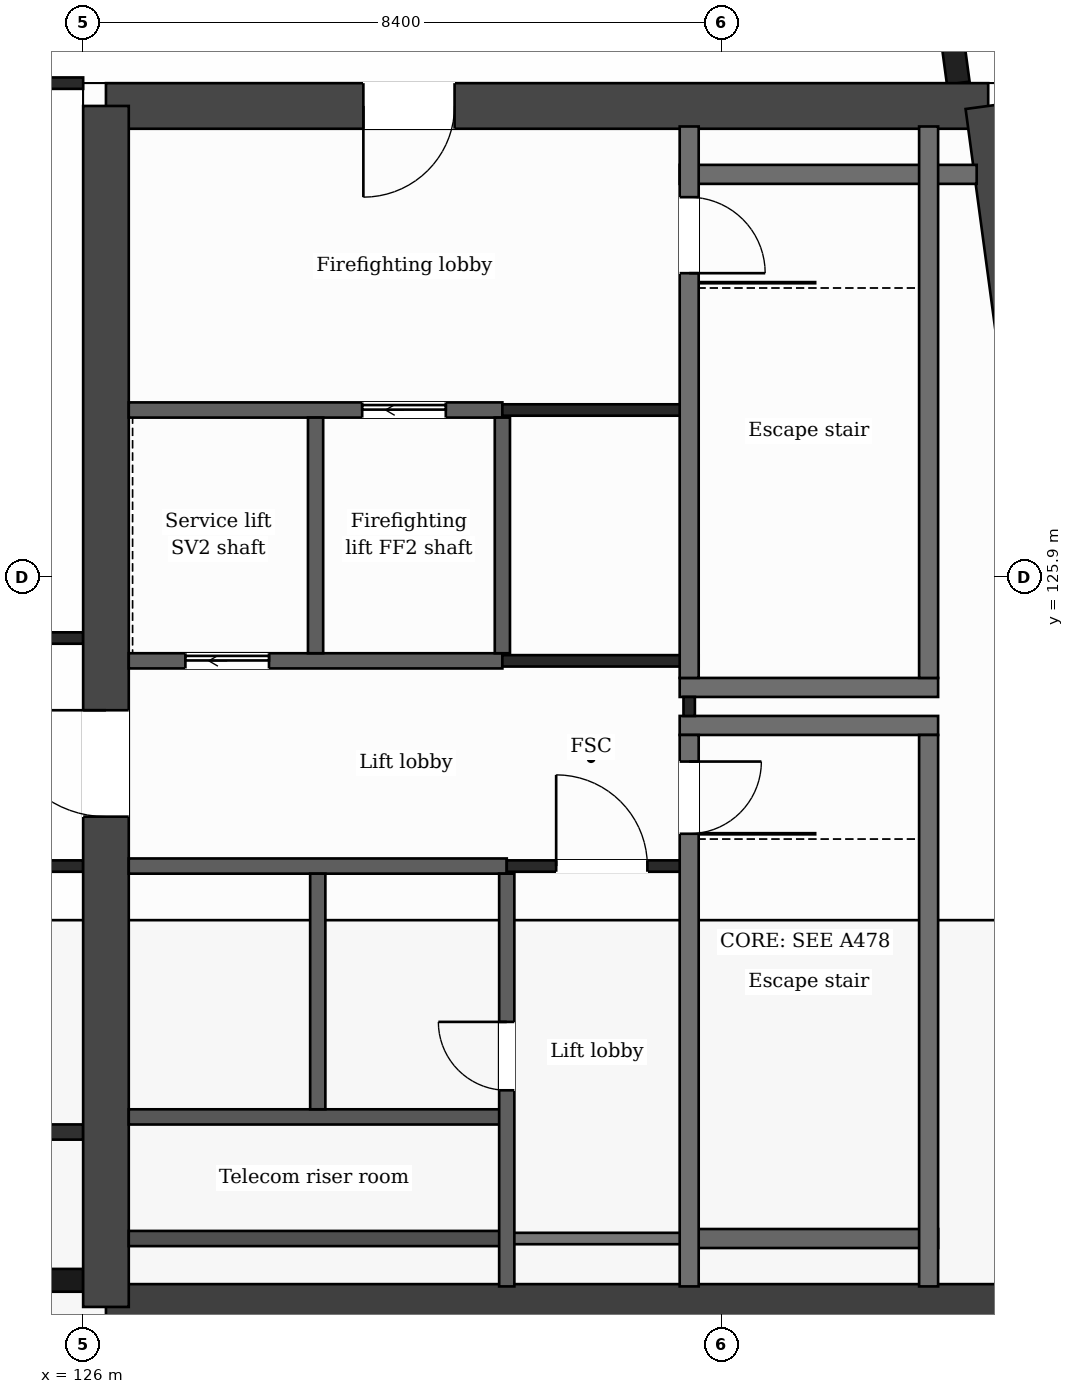
"""IFC4 building model, lengths in metres.
Left out: names, types, materials, properties, quantities, classifications, styles, units other than length and angle.
Written with IfcOpenShell. Run it as: python <this file> out.ifc"""

import sys

from ifc_helpers import new_model, si_unit, direction, frame, frame_2d, origin, place, context, subcontext, project, spatial, polyline, rectangle, outline, extrude, element, fill, save


model = new_model("IFC4")
c1 = context("Model", 3, precision=1e-05, world=origin(), true_north=direction((0.0, 1.0)))
c2 = subcontext(c1, "Body", "Model", "MODEL_VIEW")
j1 = project(units=[si_unit("LENGTHUNIT", "METRE"), si_unit("PLANEANGLEUNIT", "RADIAN")], contexts=[c1])
p1 = place(None, origin())
s1 = spatial("IfcSite", under=j1, at=p1, CompositionType="ELEMENT")
p2 = place(p1, origin())
s2 = spatial("IfcBuilding", under=s1, at=p2, CompositionType="ELEMENT")
p3 = place(p2, frame((0.0, 0.0, 319.9)))
s3 = spatial("IfcBuildingStorey", under=s2, at=p3, CompositionType="ELEMENT", Elevation=319.9)
p4 = place(p3, frame((126.3, 132.1, 0.0), z_axis=(0.0, 0.0, 1.0), x_axis=(1.0, 0.0, 0.0)))
e1 = element("IfcWall", 1, at=p4, inside=s3, PredefinedType="SHEAR", context=c2, shape_type="SweptSolid", body=[
    extrude(outline(polyline([(0.0, 0.0), (11.607, 0.0), (11.607, 9.665), (0.0, 9.665), (0.0, 0.0)])), frame((0.0, 0.3, 0.0), z_axis=(0.0, -1.0, 0.0), x_axis=(1.0, 0.0, 0.0)), (0.0, 0.0, 1.0), 0.6),
])
p5 = place(p4, frame((3.386, 0.0, 0.0)))
e2 = element("IfcOpeningElement", 2, at=p5, cuts=e1, PredefinedType="OPENING", context=c2, shape_type="SweptSolid", body=[
    extrude(rectangle(XDim=1.2, YDim=2.1, at=frame_2d((0.6, 1.05))), frame((0.0, 0.31, 0.0), z_axis=(0.0, -1.0, 0.0), x_axis=(1.0, 0.0, 0.0)), (0.0, 0.0, 1.0), 0.62),
])
p6 = place(p3, frame((137.907, 132.1, 0.0), z_axis=(0.0, 0.0, 1.0), x_axis=(0.13341345841, -0.991060466932, 0.0)))
e3 = element("IfcWall", 3, at=p6, inside=s3, PredefinedType="SHEAR", context=c2, shape_type="SweptSolid", body=[
    extrude(outline(polyline([(0.0, 0.0), (15.943, 0.0), (15.943, 1.162), (9.683, 4.5), (0.0, 9.665), (0.0, 0.0)])), frame((0.0, 0.3, 0.0), z_axis=(0.0, -1.0, 0.0), x_axis=(1.0, 0.0, 0.0)), (0.0, 0.0, 1.0), 0.6),
])
p7 = place(p3, frame((140.034, 116.3, 0.0), z_axis=(0.0, 0.0, 1.0), x_axis=(-1.0, 0.0, 0.0)))
e4 = element("IfcWall", 4, at=p7, inside=s3, PredefinedType="SHEAR", context=c2, shape_type="SweptSolid", body=[
    extrude(outline(polyline([(0.0, 0.0), (13.734, 0.0), (13.734, 1.162), (0.0, 1.162), (0.0, 0.0)])), frame((0.0, 0.3, 0.0), z_axis=(0.0, -1.0, 0.0), x_axis=(1.0, 0.0, 0.0)), (0.0, 0.0, 1.0), 0.6),
])
p8 = place(p3, frame((126.3, 116.3, 0.0), z_axis=(0.0, 0.0, 1.0), x_axis=(0.0, 1.0, 0.0)))
e5 = element("IfcWall", 5, at=p8, inside=s3, PredefinedType="SHEAR", context=c2, shape_type="SweptSolid", body=[
    extrude(outline(polyline([(0.0, 0.0), (15.8, 0.0), (15.8, 9.665), (6.203, 4.5), (0.0, 1.162), (0.0, 0.0)])), frame((0.0, 0.3, 0.0), z_axis=(0.0, -1.0, 0.0), x_axis=(1.0, 0.0, 0.0)), (0.0, 0.0, 1.0), 0.6),
])
p9 = place(p8, frame((6.45, 0.0, 0.0)))
e6 = element("IfcOpeningElement", 6, at=p9, cuts=e5, PredefinedType="OPENING", context=c2, shape_type="SweptSolid", body=[
    extrude(rectangle(XDim=1.4, YDim=2.1, at=frame_2d((0.7, 1.05))), frame((0.0, 0.31, 0.0), z_axis=(0.0, -1.0, 0.0), x_axis=(1.0, 0.0, 0.0)), (0.0, 0.0, 1.0), 0.62),
])
p10 = place(p3, frame((100.8, 116.65, 0.0), z_axis=(0.0, 0.0, 1.0), x_axis=(1.0, 0.0, 0.0)))
e7 = element("IfcWall", 7, at=p10, inside=s3, PredefinedType="SOLIDWALL", context=c2, shape_type="SweptSolid", body=[
    extrude(rectangle(XDim=25.2, YDim=0.3, at=frame_2d((12.6, 0.0))), origin(), (0.0, 0.0, 1.0), 1.3),
])
p11 = place(p3, frame((137.513, 132.4, 0.0), z_axis=(0.0, 0.0, 1.0), x_axis=(-0.133420343073, 0.991059540116, 0.0)))
e8 = element("IfcWall", 8, at=p11, inside=s3, PredefinedType="SOLIDWALL", context=c2, shape_type="SweptSolid", body=[
    extrude(rectangle(XDim=7.75, YDim=0.3, at=frame_2d((3.875, 0.0))), origin(), (0.0, 0.0, 1.0), 4.5),
])
p12 = place(p3, frame((126.6, 117.2, 0.0), z_axis=(0.0, 0.0, 1.0), x_axis=(1.0, 0.0, 0.0)))
e9 = element("IfcWall", 9, at=p12, inside=s3, PredefinedType="PARTITIONING", context=c2, shape_type="SweptSolid", body=[
    extrude(rectangle(XDim=4.973, YDim=0.2, at=frame_2d((2.486, 0.0))), origin(), (0.0, 0.0, 1.0), 1.596),
])
p13 = place(p3, frame((131.573, 117.2, 0.0), z_axis=(0.0, 0.0, 1.0), x_axis=(1.0, 0.0, 0.0)))
e10 = element("IfcWall", 10, at=p13, inside=s3, PredefinedType="PARTITIONING", context=c2, shape_type="SweptSolid", body=[
    extrude(rectangle(XDim=2.4, YDim=0.15, at=frame_2d((1.2, 0.0))), origin(), (0.0, 0.0, 1.0), 1.596),
])
p14 = place(p3, frame((133.973, 117.2, 0.0), z_axis=(0.0, 0.0, 1.0), x_axis=(1.0, 0.0, 0.0)))
e11 = element("IfcWall", 11, at=p14, inside=s3, PredefinedType="PARTITIONING", context=c2, shape_type="SweptSolid", body=[
    extrude(rectangle(XDim=3.275, YDim=0.25, at=frame_2d((1.638, 0.0))), origin(), (0.0, 0.0, 1.0), 1.596),
])
p15 = place(p3, frame((100.8, 118.601, 0.0), z_axis=(0.0, 0.0, 1.0), x_axis=(1.0, 0.0, 0.0)))
e12 = element("IfcWall", 12, at=p15, inside=s3, PredefinedType="PARTITIONING", context=c2, shape_type="SweptSolid", body=[
    extrude(rectangle(XDim=25.2, YDim=0.2, at=frame_2d((12.6, 0.0))), origin(), (0.0, 0.0, 1.0), 2.35),
])
p16 = place(p3, frame((126.6, 118.8, 0.0), z_axis=(0.0, 0.0, 1.0), x_axis=(1.0, 0.0, 0.0)))
e13 = element("IfcWall", 13, at=p16, inside=s3, PredefinedType="PARTITIONING", context=c2, shape_type="SweptSolid", body=[
    extrude(rectangle(XDim=4.973, YDim=0.2, at=frame_2d((2.486, 0.0))), origin(), (0.0, 0.0, 1.0), 2.457),
])
p17 = place(p3, frame((126.6, 122.1, 0.0), z_axis=(0.0, 0.0, 1.0), x_axis=(1.0, 0.0, 0.0)))
e14 = element("IfcWall", 14, at=p17, inside=s3, PredefinedType="PARTITIONING", context=c2, shape_type="SweptSolid", body=[
    extrude(rectangle(XDim=4.973, YDim=0.2, at=frame_2d((2.486, 0.0))), origin(), (0.0, 0.0, 1.0), 4.05),
])
p18 = place(p3, frame((131.573, 122.1, 0.0), z_axis=(0.0, 0.0, 1.0), x_axis=(1.0, 0.0, 0.0)))
e15 = element("IfcWall", 15, at=p18, inside=s3, PredefinedType="PARTITIONING", context=c2, shape_type="SweptSolid", body=[
    extrude(rectangle(XDim=2.4, YDim=0.15, at=frame_2d((1.2, 0.0))), origin(), (0.0, 0.0, 1.0), 4.05),
])
p19 = place(p18, frame((0.65, 0.0, 0.0)))
e16 = element("IfcOpeningElement", 16, at=p19, cuts=e15, PredefinedType="OPENING", context=c2, shape_type="SweptSolid", body=[
    extrude(rectangle(XDim=1.2, YDim=2.1, at=frame_2d((0.6, 1.05))), frame((0.0, 0.085, 0.0), z_axis=(0.0, -1.0, 0.0), x_axis=(1.0, 0.0, 0.0)), (0.0, 0.0, 1.0), 0.17),
])
p20 = place(p3, frame((100.8, 122.1, 0.0), z_axis=(0.0, 0.0, 1.0), x_axis=(1.0, 0.0, 0.0)))
e17 = element("IfcWall", 17, at=p20, inside=s3, PredefinedType="PARTITIONING", context=c2, shape_type="SweptSolid", body=[
    extrude(rectangle(XDim=25.2, YDim=0.15, at=frame_2d((12.6, 0.0))), origin(), (0.0, 0.0, 1.0), 4.05),
])
p21 = place(p20, frame((3.6, 0.0, 0.0)))
e18 = element("IfcOpeningElement", 18, at=p21, cuts=e17, PredefinedType="OPENING", context=c2, shape_type="SweptSolid", body=[
    extrude(rectangle(XDim=1.2, YDim=2.1, at=frame_2d((0.6, 1.05))), frame((0.0, 0.085, 0.0), z_axis=(0.0, -1.0, 0.0), x_axis=(1.0, 0.0, 0.0)), (0.0, 0.0, 1.0), 0.17),
])
p22 = place(p20, frame((12.0, 0.0, 0.0)))
e19 = element("IfcOpeningElement", 19, at=p22, cuts=e17, PredefinedType="OPENING", context=c2, shape_type="SweptSolid", body=[
    extrude(rectangle(XDim=1.2, YDim=2.1, at=frame_2d((0.6, 1.05))), frame((0.0, 0.085, 0.0), z_axis=(0.0, -1.0, 0.0), x_axis=(1.0, 0.0, 0.0)), (0.0, 0.0, 1.0), 0.17),
])
p23 = place(p20, frame((20.4, 0.0, 0.0)))
e20 = element("IfcOpeningElement", 20, at=p23, cuts=e17, PredefinedType="OPENING", context=c2, shape_type="SweptSolid", body=[
    extrude(rectangle(XDim=1.2, YDim=2.1, at=frame_2d((0.6, 1.05))), frame((0.0, 0.085, 0.0), z_axis=(0.0, -1.0, 0.0), x_axis=(1.0, 0.0, 0.0)), (0.0, 0.0, 1.0), 0.17),
])
for number, where, z_axis, x_axis in (
    (21, (133.848, 123.95, 0.0), (0.0, 0.0, 1.0), (1.0, 0.0, 0.0)),
    (22, (133.848, 124.45, 0.0), (0.0, 0.0, 1.0), (1.0, 0.0, 0.0)),
):
    element("IfcWall", number, at=place(p3, frame(where, z_axis=z_axis, x_axis=x_axis)), inside=s3, PredefinedType="PARTITIONING", context=c2, shape_type="SweptSolid", body=[
        extrude(rectangle(XDim=3.4, YDim=0.25, at=frame_2d((1.7, 0.0))), origin(), (0.0, 0.0, 1.0), 4.05),
    ])
p24 = place(p3, frame((126.6, 124.8, 0.0), z_axis=(0.0, 0.0, 1.0), x_axis=(1.0, 0.0, 0.0)))
e23 = element("IfcWall", 23, at=p24, inside=s3, PredefinedType="PARTITIONING", context=c2, shape_type="SweptSolid", body=[
    extrude(rectangle(XDim=4.915, YDim=0.2, at=frame_2d((2.458, 0.0))), origin(), (0.0, 0.0, 1.0), 4.05),
])
p25 = place(p24, frame((0.745, 0.0, 0.0)))
e24 = element("IfcOpeningElement", 24, at=p25, cuts=e23, PredefinedType="OPENING", context=c2, shape_type="SweptSolid", body=[
    extrude(rectangle(XDim=1.1, YDim=2.1, at=frame_2d((0.55, 1.05))), frame((0.0, 0.11, 0.0), z_axis=(0.0, -1.0, 0.0), x_axis=(1.0, 0.0, 0.0)), (0.0, 0.0, 1.0), 0.22),
])
p26 = place(p3, frame((131.515, 124.8, 0.0), z_axis=(0.0, 0.0, 1.0), x_axis=(1.0, 0.0, 0.0)))
e25 = element("IfcWall", 25, at=p26, inside=s3, PredefinedType="PARTITIONING", context=c2, shape_type="SweptSolid", body=[
    extrude(rectangle(XDim=2.583, YDim=0.15, at=frame_2d((1.291, 0.0))), origin(), (0.0, 0.0, 1.0), 4.05),
])
p27 = place(p3, frame((100.8, 125.1, 0.0), z_axis=(0.0, 0.0, 1.0), x_axis=(1.0, 0.0, 0.0)))
e26 = element("IfcWall", 26, at=p27, inside=s3, PredefinedType="PARTITIONING", context=c2, shape_type="SweptSolid", body=[
    extrude(rectangle(XDim=25.2, YDim=0.15, at=frame_2d((12.6, 0.0))), origin(), (0.0, 0.0, 1.0), 4.05),
])
p28 = place(p27, frame((3.6, 0.0, 0.0)))
e27 = element("IfcOpeningElement", 27, at=p28, cuts=e26, PredefinedType="OPENING", context=c2, shape_type="SweptSolid", body=[
    extrude(rectangle(XDim=1.2, YDim=2.1, at=frame_2d((0.6, 1.05))), frame((0.0, 0.085, 0.0), z_axis=(0.0, -1.0, 0.0), x_axis=(1.0, 0.0, 0.0)), (0.0, 0.0, 1.0), 0.17),
])
p29 = place(p27, frame((12.0, 0.0, 0.0)))
e28 = element("IfcOpeningElement", 28, at=p29, cuts=e26, PredefinedType="OPENING", context=c2, shape_type="SweptSolid", body=[
    extrude(rectangle(XDim=1.2, YDim=2.1, at=frame_2d((0.6, 1.05))), frame((0.0, 0.085, 0.0), z_axis=(0.0, -1.0, 0.0), x_axis=(1.0, 0.0, 0.0)), (0.0, 0.0, 1.0), 0.17),
])
p30 = place(p27, frame((20.4, 0.0, 0.0)))
e29 = element("IfcOpeningElement", 29, at=p30, cuts=e26, PredefinedType="OPENING", context=c2, shape_type="SweptSolid", body=[
    extrude(rectangle(XDim=1.2, YDim=2.1, at=frame_2d((0.6, 1.05))), frame((0.0, 0.085, 0.0), z_axis=(0.0, -1.0, 0.0), x_axis=(1.0, 0.0, 0.0)), (0.0, 0.0, 1.0), 0.17),
])
p31 = place(p3, frame((126.6, 128.1, 0.0), z_axis=(0.0, 0.0, 1.0), x_axis=(1.0, 0.0, 0.0)))
e30 = element("IfcWall", 30, at=p31, inside=s3, PredefinedType="PARTITIONING", context=c2, shape_type="SweptSolid", body=[
    extrude(rectangle(XDim=4.915, YDim=0.2, at=frame_2d((2.458, 0.0))), origin(), (0.0, 0.0, 1.0), 4.05),
])
p32 = place(p31, frame((3.071, 0.0, 0.0)))
e31 = element("IfcOpeningElement", 31, at=p32, cuts=e30, PredefinedType="OPENING", context=c2, shape_type="SweptSolid", body=[
    extrude(rectangle(XDim=1.1, YDim=2.1, at=frame_2d((0.55, 1.05))), frame((0.0, 0.11, 0.0), z_axis=(0.0, -1.0, 0.0), x_axis=(1.0, 0.0, 0.0)), (0.0, 0.0, 1.0), 0.22),
])
p33 = place(p3, frame((131.515, 128.1, 0.0), z_axis=(0.0, 0.0, 1.0), x_axis=(1.0, 0.0, 0.0)))
e32 = element("IfcWall", 32, at=p33, inside=s3, PredefinedType="PARTITIONING", context=c2, shape_type="SweptSolid", body=[
    extrude(rectangle(XDim=2.458, YDim=0.15, at=frame_2d((1.229, 0.0))), origin(), (0.0, 0.0, 1.0), 4.05),
])
p34 = place(p3, frame((133.848, 131.2, 0.0), z_axis=(0.0, 0.0, 1.0), x_axis=(1.0, 0.0, 0.0)))
e33 = element("IfcWall", 33, at=p34, inside=s3, PredefinedType="PARTITIONING", context=c2, shape_type="SweptSolid", body=[
    extrude(rectangle(XDim=3.907, YDim=0.25, at=frame_2d((1.954, 0.0))), origin(), (0.0, 0.0, 1.0), 4.05),
])
p35 = place(p3, frame((100.8, 132.4, 0.0), z_axis=(0.0, 0.0, 1.0), x_axis=(1.0, 0.0, 0.0)))
e34 = element("IfcWall", 34, at=p35, inside=s3, PredefinedType="PARTITIONING", context=c2, shape_type="SweptSolid", body=[
    extrude(rectangle(XDim=25.2, YDim=0.15, at=frame_2d((12.6, 0.0))), origin(), (0.0, 0.0, 1.0), 4.05),
])
p36 = place(p3, frame((129.058, 124.9, 0.0), z_axis=(0.0, 0.0, 1.0), x_axis=(0.0, 1.0, 0.0)))
e35 = element("IfcWall", 35, at=p36, inside=s3, PredefinedType="PARTITIONING", context=c2, shape_type="SweptSolid", body=[
    extrude(rectangle(XDim=3.1, YDim=0.2, at=frame_2d((1.55, 0.0))), origin(), (0.0, 0.0, 1.0), 4.05),
])
p37 = place(p3, frame((129.086, 118.9, 0.0), z_axis=(0.0, 0.0, 1.0), x_axis=(0.0, 1.0, 0.0)))
e36 = element("IfcWall", 36, at=p37, inside=s3, PredefinedType="PARTITIONING", context=c2, shape_type="SweptSolid", body=[
    extrude(outline(polyline([(0.0, 0.0), (3.1, 0.0), (3.1, 4.05), (2.86, 4.05), (0.0, 2.511), (0.0, 0.0)])), frame((0.0, 0.1, 0.0), z_axis=(0.0, -1.0, 0.0), x_axis=(1.0, 0.0, 0.0)), (0.0, 0.0, 1.0), 0.2),
])
p38 = place(p3, frame((131.515, 124.9, 0.0), z_axis=(0.0, 0.0, 1.0), x_axis=(0.0, 1.0, 0.0)))
e37 = element("IfcWall", 37, at=p38, inside=s3, PredefinedType="PARTITIONING", context=c2, shape_type="SweptSolid", body=[
    extrude(rectangle(XDim=3.1, YDim=0.2, at=frame_2d((1.55, 0.0))), origin(), (0.0, 0.0, 1.0), 4.05),
])
p39 = place(p3, frame((131.573, 116.57, 0.0), z_axis=(0.0, 0.0, 1.0), x_axis=(0.0, 1.0, 0.0)))
e38 = element("IfcWall", 38, at=p39, inside=s3, PredefinedType="PARTITIONING", context=c2, shape_type="SweptSolid", body=[
    extrude(outline(polyline([(0.0, 0.0), (5.43, 0.0), (5.43, 4.05), (5.19, 4.05), (0.0, 1.257), (0.0, 0.0)])), frame((0.0, 0.1, 0.0), z_axis=(0.0, -1.0, 0.0), x_axis=(1.0, 0.0, 0.0)), (0.0, 0.0, 1.0), 0.2),
])
p40 = place(p39, frame((2.58, 0.0, 0.0)))
e39 = element("IfcOpeningElement", 39, at=p40, cuts=e38, PredefinedType="OPENING", context=c2, shape_type="SweptSolid", body=[
    extrude(rectangle(XDim=0.9, YDim=2.1, at=frame_2d((0.45, 1.05))), frame((0.0, 0.11, 0.0), z_axis=(0.0, -1.0, 0.0), x_axis=(1.0, 0.0, 0.0)), (0.0, 0.0, 1.0), 0.22),
])
p41 = place(p3, frame((133.973, 124.075, 0.0), z_axis=(0.0, 0.0, 1.0), x_axis=(0.0, 1.0, 0.0)))
e40 = element("IfcWall", 40, at=p41, inside=s3, PredefinedType="PARTITIONING", context=c2, shape_type="SweptSolid", body=[
    extrude(rectangle(XDim=0.25, YDim=0.15, at=frame_2d((0.125, 0.0))), origin(), (0.0, 0.0, 1.0), 4.05),
])
p42 = place(p3, frame((133.973, 116.57, 0.0), z_axis=(0.0, 0.0, 1.0), x_axis=(0.0, 1.0, 0.0)))
e41 = element("IfcWall", 41, at=p42, inside=s3, PredefinedType="PARTITIONING", context=c2, shape_type="SweptSolid", body=[
    extrude(outline(polyline([(0.0, 0.0), (7.255, 0.0), (7.255, 4.05), (5.19, 4.05), (0.0, 1.257), (0.0, 0.0)])), frame((0.0, 0.125, 0.0), z_axis=(0.0, -1.0, 0.0), x_axis=(1.0, 0.0, 0.0)), (0.0, 0.0, 1.0), 0.25),
])
p43 = place(p42, frame((5.955, 0.0, 0.0)))
e42 = element("IfcOpeningElement", 42, at=p43, cuts=e41, PredefinedType="OPENING", context=c2, shape_type="SweptSolid", body=[
    extrude(rectangle(XDim=0.95, YDim=2.1, at=frame_2d((0.475, 1.05))), frame((0.0, 0.135, 0.0), z_axis=(0.0, -1.0, 0.0), x_axis=(1.0, 0.0, 0.0)), (0.0, 0.0, 1.0), 0.27),
])
p44 = place(p3, frame((133.973, 124.575, 0.0), z_axis=(0.0, 0.0, 1.0), x_axis=(0.0, 1.0, 0.0)))
e43 = element("IfcWall", 43, at=p44, inside=s3, PredefinedType="PARTITIONING", context=c2, shape_type="SweptSolid", body=[
    extrude(rectangle(XDim=7.255, YDim=0.25, at=frame_2d((3.627, 0.0))), origin(), (0.0, 0.0, 1.0), 4.05),
])
p45 = place(p44, frame((5.325, 0.0, 0.0)))
e44 = element("IfcOpeningElement", 44, at=p45, cuts=e43, PredefinedType="OPENING", context=c2, shape_type="SweptSolid", body=[
    extrude(rectangle(XDim=1.0, YDim=2.1, at=frame_2d((0.5, 1.05))), frame((0.0, 0.135, 0.0), z_axis=(0.0, -1.0, 0.0), x_axis=(1.0, 0.0, 0.0)), (0.0, 0.0, 1.0), 0.27),
])
p46 = place(p3, frame((137.123, 116.57, 0.0), z_axis=(0.0, 0.0, 1.0), x_axis=(0.0, 1.0, 0.0)))
e45 = element("IfcWall", 45, at=p46, inside=s3, PredefinedType="PARTITIONING", context=c2, shape_type="SweptSolid", body=[
    extrude(outline(polyline([(0.0, 0.0), (7.255, 0.0), (7.255, 4.05), (5.19, 4.05), (0.0, 1.257), (0.0, 0.0)])), frame((0.0, 0.125, 0.0), z_axis=(0.0, -1.0, 0.0), x_axis=(1.0, 0.0, 0.0)), (0.0, 0.0, 1.0), 0.25),
])
p47 = place(p3, frame((137.123, 124.575, 0.0), z_axis=(0.0, 0.0, 1.0), x_axis=(0.0, 1.0, 0.0)))
e46 = element("IfcWall", 46, at=p47, inside=s3, PredefinedType="PARTITIONING", context=c2, shape_type="SweptSolid", body=[
    extrude(rectangle(XDim=7.255, YDim=0.25, at=frame_2d((3.627, 0.0))), origin(), (0.0, 0.0, 1.0), 4.05),
])
p48 = place(p19, origin())
e47 = element("IfcDoor", 47, at=p48, inside=s3, OperationType="SINGLE_SWING_LEFT", PredefinedType="DOOR", context=c2, shape_type="SweptSolid", body=[
    extrude(rectangle(XDim=1.2, YDim=2.1, at=frame_2d((0.6, 1.05))), frame((0.0, 0.025, 0.0), z_axis=(0.0, -1.0, 0.0), x_axis=(1.0, 0.0, 0.0)), (0.0, 0.0, 1.0), 0.05),
])
fill(e16, e47)
p49 = place(p32, origin())
e48 = element("IfcDoor", 48, at=p49, inside=s3, OperationType="SLIDING_TO_LEFT", PredefinedType="DOOR", context=c2, shape_type="SweptSolid", body=[
    extrude(rectangle(XDim=1.1, YDim=2.1, at=frame_2d((0.55, 1.05))), frame((0.0, 0.025, 0.0), z_axis=(0.0, -1.0, 0.0), x_axis=(1.0, 0.0, 0.0)), (0.0, 0.0, 1.0), 0.05),
])
fill(e31, e48)
p50 = place(p25, origin())
e49 = element("IfcDoor", 49, at=p50, inside=s3, OperationType="SLIDING_TO_LEFT", PredefinedType="DOOR", context=c2, shape_type="SweptSolid", body=[
    extrude(rectangle(XDim=1.1, YDim=2.1, at=frame_2d((0.55, 1.05))), frame((0.0, 0.025, 0.0), z_axis=(0.0, -1.0, 0.0), x_axis=(1.0, 0.0, 0.0)), (0.0, 0.0, 1.0), 0.05),
])
fill(e24, e49)
p51 = place(p43, origin())
e50 = element("IfcDoor", 50, at=p51, inside=s3, OperationType="SINGLE_SWING_RIGHT", PredefinedType="DOOR", context=c2, shape_type="SweptSolid", body=[
    extrude(rectangle(XDim=0.95, YDim=2.1, at=frame_2d((0.475, 1.05))), frame((0.0, 0.025, 0.0), z_axis=(0.0, -1.0, 0.0), x_axis=(1.0, 0.0, 0.0)), (0.0, 0.0, 1.0), 0.05),
])
fill(e42, e50)
p52 = place(p45, origin())
e51 = element("IfcDoor", 51, at=p52, inside=s3, OperationType="SINGLE_SWING_LEFT", PredefinedType="DOOR", context=c2, shape_type="SweptSolid", body=[
    extrude(rectangle(XDim=1.0, YDim=2.1, at=frame_2d((0.5, 1.05))), frame((0.0, 0.025, 0.0), z_axis=(0.0, -1.0, 0.0), x_axis=(1.0, 0.0, 0.0)), (0.0, 0.0, 1.0), 0.05),
])
fill(e44, e51)
p53 = place(p40, origin())
e52 = element("IfcDoor", 52, at=p53, inside=s3, OperationType="SINGLE_SWING_RIGHT", PredefinedType="DOOR", context=c2, shape_type="SweptSolid", body=[
    extrude(rectangle(XDim=0.9, YDim=2.1, at=frame_2d((0.45, 1.05))), frame((0.0, 0.025, 0.0), z_axis=(0.0, -1.0, 0.0), x_axis=(1.0, 0.0, 0.0)), (0.0, 0.0, 1.0), 0.05),
])
fill(e39, e52)
p54 = place(p5, origin())
e53 = element("IfcDoor", 53, at=p54, inside=s3, OperationType="SINGLE_SWING_LEFT", PredefinedType="DOOR", context=c2, shape_type="SweptSolid", body=[
    extrude(rectangle(XDim=1.2, YDim=2.1, at=frame_2d((0.6, 1.05))), frame((0.0, 0.025, 0.0), z_axis=(0.0, -1.0, 0.0), x_axis=(1.0, 0.0, 0.0)), (0.0, 0.0, 1.0), 0.05),
])
fill(e2, e53)
p55 = place(p9, origin())
e54 = element("IfcDoor", 54, at=p55, inside=s3, OperationType="SINGLE_SWING_RIGHT", PredefinedType="DOOR", context=c2, shape_type="SweptSolid", body=[
    extrude(rectangle(XDim=1.4, YDim=2.1, at=frame_2d((0.7, 1.05))), frame((0.0, 0.025, 0.0), z_axis=(0.0, -1.0, 0.0), x_axis=(1.0, 0.0, 0.0)), (0.0, 0.0, 1.0), 0.05),
])
fill(e6, e54)
save(model, sys.argv[1])
